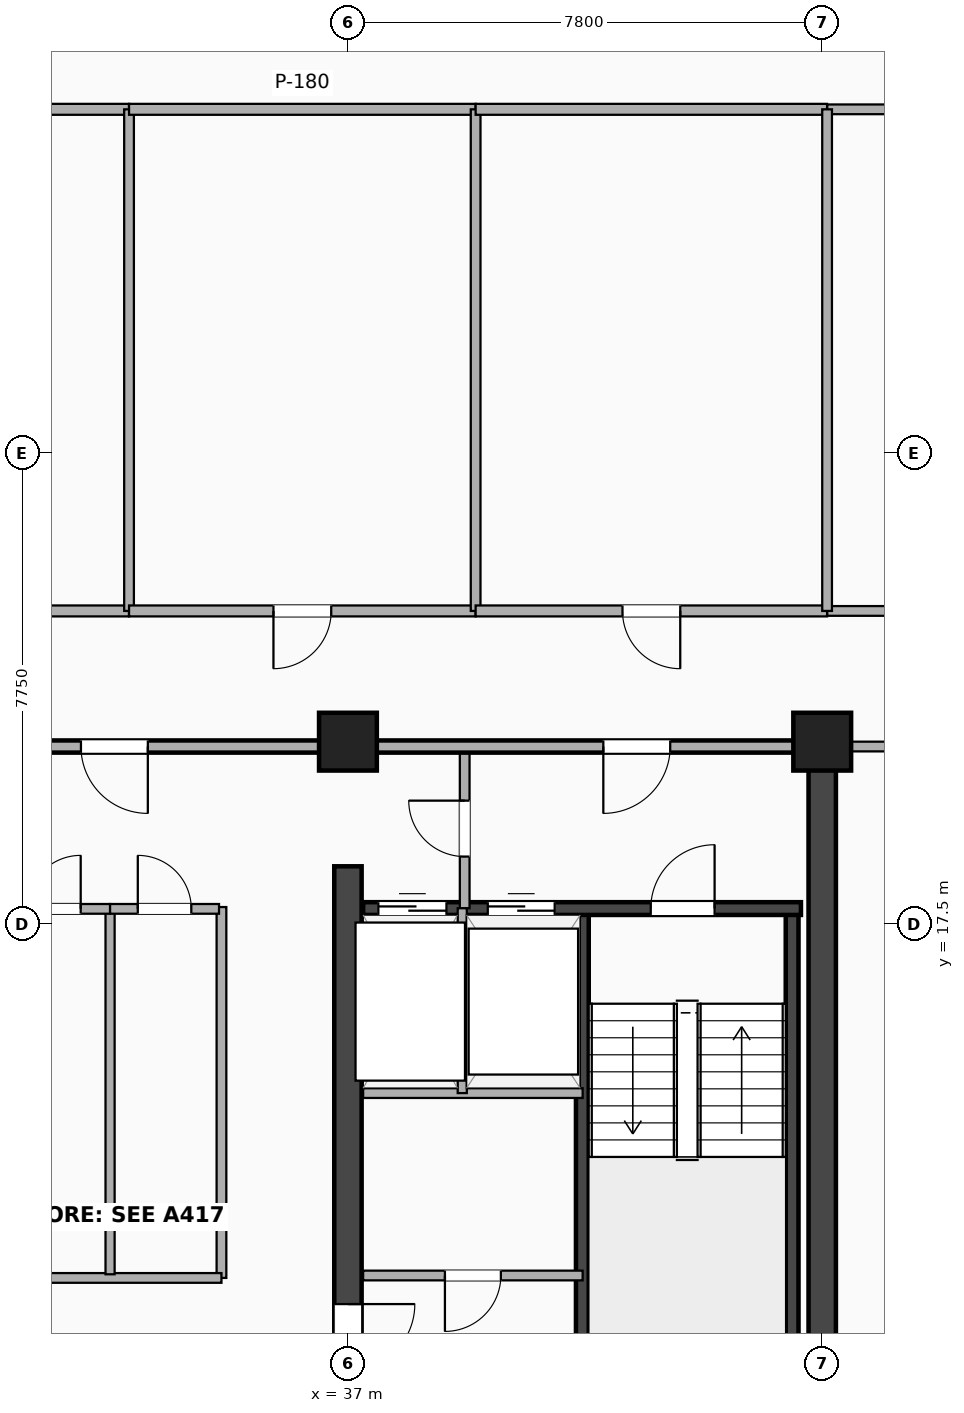
"""IFC4 building model, lengths in metres.
Left out: names, types, materials, properties, quantities, classifications, styles, units other than length and angle.
Written with IfcOpenShell. Run it as: python <this file> out.ifc"""

import sys

from ifc_helpers import new_model, si_unit, direction, frame, frame_2d, origin, origin_2d, place, context, subcontext, project, spatial, rectangle, extrude, element, fill, save


model = new_model("IFC4")
c1 = context("Model", 3, precision=1e-05, world=origin(), true_north=direction((0.0, 1.0)))
c2 = subcontext(c1, "Body", "Model", "MODEL_VIEW")
j1 = project(units=[si_unit("LENGTHUNIT", "METRE"), si_unit("PLANEANGLEUNIT", "RADIAN")], contexts=[c1])
p1 = place(None, origin())
s1 = spatial("IfcSite", under=j1, at=p1, CompositionType="ELEMENT")
p2 = place(p1, origin())
s2 = spatial("IfcBuilding", under=s1, at=p2, CompositionType="ELEMENT")
p3 = place(p2, frame((0.0, 0.0, 224.9)))
s3 = spatial("IfcBuildingStorey", under=s2, at=p3, CompositionType="ELEMENT", Elevation=224.9)
p4 = place(p3, frame((44.8, 3.5, 0.0), z_axis=(0.0, 0.0, 1.0), x_axis=(0.0, 1.0, 0.0)))
e1 = element("IfcWall", 1, at=p4, inside=s3, PredefinedType="SHEAR", context=c2, shape_type="SweptSolid", body=[
    extrude(rectangle(XDim=16.9, YDim=0.45, at=frame_2d((8.45, 0.0))), origin(), (0.0, 0.0, 1.0), 3.26),
])
p5 = place(p3, frame((37.0, 3.5, 0.0), z_axis=(0.0, 0.0, 1.0), x_axis=(0.0, 1.0, 0.0)))
e2 = element("IfcWall", 2, at=p5, inside=s3, PredefinedType="SHEAR", context=c2, shape_type="SweptSolid", body=[
    extrude(rectangle(XDim=14.95, YDim=0.45, at=frame_2d((7.475, 0.0))), origin(), (0.0, 0.0, 1.0), 3.26),
])
p6 = place(p5, frame((6.65, 0.0, 0.0)))
e3 = element("IfcOpeningElement", 3, at=p6, cuts=e2, PredefinedType="OPENING", context=c2, shape_type="SweptSolid", body=[
    extrude(rectangle(XDim=1.1, YDim=2.15, at=frame_2d((0.55, 1.075))), frame((0.0, 0.235, 0.0), z_axis=(0.0, -1.0, 0.0), x_axis=(1.0, 0.0, 0.0)), (0.0, 0.0, 1.0), 0.47),
])
for number, where, z_axis, x_axis in (
    (4, (40.855, 9.745, 0.0), (0.0, 0.0, 1.0), (0.0, 1.0, 0.0)),
    (5, (44.305, 9.745, 0.0), (0.0, 0.0, 1.0), (0.0, 1.0, 0.0)),
):
    element("IfcWall", number, at=place(p3, frame(where, z_axis=z_axis, x_axis=x_axis)), inside=s3, PredefinedType="SHEAR", context=c2, shape_type="SweptSolid", body=[
        extrude(rectangle(XDim=8.01, YDim=0.21, at=frame_2d((4.005, 0.0))), origin(), (0.0, 0.0, 1.0), 3.26),
    ])
p7 = place(p3, frame((37.25, 17.755, 0.0), z_axis=(0.0, 0.0, 1.0), x_axis=(1.0, 0.0, 0.0)))
e6 = element("IfcWall", 6, at=p7, inside=s3, PredefinedType="SHEAR", context=c2, shape_type="SweptSolid", body=[
    extrude(rectangle(XDim=7.2, YDim=0.21, at=frame_2d((3.6, 0.0))), origin(), (0.0, 0.0, 1.0), 3.26),
])
p8 = place(p7, frame((0.25, 0.0, 0.0)))
e7 = element("IfcOpeningElement", 7, at=p8, cuts=e6, PredefinedType="OPENING", context=c2, shape_type="SweptSolid", body=[
    extrude(rectangle(XDim=1.12, YDim=2.2, at=frame_2d((0.56, 1.1))), frame((0.0, 0.115, 0.0), z_axis=(0.0, -1.0, 0.0), x_axis=(1.0, 0.0, 0.0)), (0.0, 0.0, 1.0), 0.23),
])
p9 = place(p7, frame((2.05, 0.0, 0.0)))
e8 = element("IfcOpeningElement", 8, at=p9, cuts=e6, PredefinedType="OPENING", context=c2, shape_type="SweptSolid", body=[
    extrude(rectangle(XDim=1.1, YDim=2.18, at=frame_2d((0.55, 1.09))), frame((0.0, 0.115, 0.0), z_axis=(0.0, -1.0, 0.0), x_axis=(1.0, 0.0, 0.0)), (0.0, 0.0, 1.0), 0.23),
])
p10 = place(p7, frame((5.78, 0.0, 0.0), z_axis=(0.0, 0.0, 1.0), x_axis=(-1.0, 0.0, 0.0)))
e9 = element("IfcOpeningElement", 9, at=p10, cuts=e6, PredefinedType="OPENING", context=c2, shape_type="SweptSolid", body=[
    extrude(rectangle(XDim=1.05, YDim=2.15, at=frame_2d((0.525, 1.075))), frame((0.0, 0.115, 0.0), z_axis=(0.0, -1.0, 0.0), x_axis=(1.0, 0.0, 0.0)), (0.0, 0.0, 1.0), 0.23),
])
for number, where, z_axis, x_axis in (
    (10, (37.0, 20.5, -0.24), (0.0, 0.0, 1.0), (1.0, 0.0, 0.0)),
    (11, (44.8, 20.5, -0.24), (0.0, 0.0, 1.0), (1.0, 0.0, 0.0)),
):
    element("IfcColumn", number, at=place(p3, frame(where, z_axis=z_axis, x_axis=x_axis)), inside=s3, PredefinedType="COLUMN", context=c2, shape_type="SweptSolid", body=[
        extrude(rectangle(XDim=0.95, YDim=0.95, at=origin_2d()), origin(), (0.0, 0.0, 1.0), 3.5),
    ])
p11 = place(p3, frame((38.92, 17.76, 0.0), z_axis=(0.0, 0.0, 1.0), x_axis=(0.0, 1.0, 0.0)))
e12 = element("IfcWall", 12, at=p11, inside=s3, PredefinedType="PARTITIONING", context=c2, shape_type="SweptSolid", body=[
    extrude(rectangle(XDim=2.66, YDim=0.16, at=frame_2d((1.33, 0.0))), origin(), (0.0, 0.0, 1.0), 2.706),
])
p12 = place(p11, frame((1.77, 0.0, 0.0), z_axis=(0.0, 0.0, 1.0), x_axis=(-1.0, 0.0, 0.0)))
e13 = element("IfcOpeningElement", 13, at=p12, cuts=e12, PredefinedType="OPENING", context=c2, shape_type="SweptSolid", body=[
    extrude(rectangle(XDim=0.92, YDim=2.08, at=frame_2d((0.46, 1.04))), frame((0.0, 0.09, 0.0), z_axis=(0.0, -1.0, 0.0), x_axis=(1.0, 0.0, 0.0)), (0.0, 0.0, 1.0), 0.18),
])
p13 = place(p3, frame((37.25, 14.72, 0.0), z_axis=(0.0, 0.0, 1.0), x_axis=(1.0, 0.0, 0.0)))
e14 = element("IfcWall", 14, at=p13, inside=s3, PredefinedType="PARTITIONING", context=c2, shape_type="SweptSolid", body=[
    extrude(rectangle(XDim=3.61, YDim=0.16, at=frame_2d((1.805, 0.0))), origin(), (0.0, 0.0, 1.0), 3.26),
])
p14 = place(p3, frame((38.88, 14.72, 0.0), z_axis=(0.0, 0.0, 1.0), x_axis=(0.0, 1.0, 0.0)))
e15 = element("IfcWall", 15, at=p14, inside=s3, PredefinedType="PARTITIONING", context=c2, shape_type="SweptSolid", body=[
    extrude(rectangle(XDim=3.04, YDim=0.15, at=frame_2d((1.52, 0.0))), origin(), (0.0, 0.0, 1.0), 3.26),
])
p15 = place(p3, frame((29.2, 20.42, 0.0), z_axis=(0.0, 0.0, 1.0), x_axis=(1.0, 0.0, 0.0)))
e16 = element("IfcWall", 16, at=p15, inside=s3, PredefinedType="PARTITIONING", context=c2, shape_type="SweptSolid", body=[
    extrude(rectangle(XDim=7.8, YDim=0.2, at=frame_2d((3.9, 0.0))), origin(), (0.0, 0.0, 1.0), 2.472),
])
p16 = place(p15, frame((3.409, 0.0, 0.0)))
e17 = element("IfcOpeningElement", 17, at=p16, cuts=e16, PredefinedType="OPENING", context=c2, shape_type="SweptSolid", body=[
    extrude(rectangle(XDim=1.1, YDim=2.15, at=frame_2d((0.55, 1.075))), frame((0.0, 0.11, 0.0), z_axis=(0.0, -1.0, 0.0), x_axis=(1.0, 0.0, 0.0)), (0.0, 0.0, 1.0), 0.22),
])
p17 = place(p3, frame((37.0, 20.42, 0.0), z_axis=(0.0, 0.0, 1.0), x_axis=(1.0, 0.0, 0.0)))
e18 = element("IfcWall", 18, at=p17, inside=s3, PredefinedType="PARTITIONING", context=c2, shape_type="SweptSolid", body=[
    extrude(rectangle(XDim=7.45, YDim=0.2, at=frame_2d((3.725, 0.0))), origin(), (0.0, 0.0, 1.0), 2.472),
])
p18 = place(p17, frame((4.2, 0.0, 0.0)))
e19 = element("IfcOpeningElement", 19, at=p18, cuts=e18, PredefinedType="OPENING", context=c2, shape_type="SweptSolid", body=[
    extrude(rectangle(XDim=1.1, YDim=2.15, at=frame_2d((0.55, 1.075))), frame((0.0, 0.11, 0.0), z_axis=(0.0, -1.0, 0.0), x_axis=(1.0, 0.0, 0.0)), (0.0, 0.0, 1.0), 0.22),
])
p19 = place(p3, frame((37.25, 11.72, 0.0), z_axis=(0.0, 0.0, 1.0), x_axis=(1.0, 0.0, 0.0)))
e20 = element("IfcWall", 20, at=p19, inside=s3, PredefinedType="PARTITIONING", context=c2, shape_type="SweptSolid", body=[
    extrude(rectangle(XDim=3.61, YDim=0.16, at=frame_2d((1.805, 0.0))), origin(), (0.0, 0.0, 1.0), 3.26),
])
p20 = place(p19, frame((1.345, 0.0, 0.0)))
e21 = element("IfcOpeningElement", 21, at=p20, cuts=e20, PredefinedType="OPENING", context=c2, shape_type="SweptSolid", body=[
    extrude(rectangle(XDim=0.92, YDim=2.08, at=frame_2d((0.46, 1.04))), frame((0.0, 0.09, 0.0), z_axis=(0.0, -1.0, 0.0), x_axis=(1.0, 0.0, 0.0)), (0.0, 0.0, 1.0), 0.18),
])
p21 = place(p3, frame((34.92, 11.68, 0.0), z_axis=(0.0, 0.0, 1.0), x_axis=(0.0, 1.0, 0.0)))
e22 = element("IfcWall", 22, at=p21, inside=s3, PredefinedType="PARTITIONING", context=c2, shape_type="SweptSolid", body=[
    extrude(rectangle(XDim=6.1, YDim=0.16, at=frame_2d((3.05, 0.0))), origin(), (0.0, 0.0, 1.0), 3.26),
])
p22 = place(p3, frame((29.2, 11.68, 0.0), z_axis=(0.0, 0.0, 1.0), x_axis=(1.0, 0.0, 0.0)))
e23 = element("IfcWall", 23, at=p22, inside=s3, PredefinedType="PARTITIONING", context=c2, shape_type="SweptSolid", body=[
    extrude(rectangle(XDim=5.72, YDim=0.16, at=frame_2d((2.86, 0.0))), origin(), (0.0, 0.0, 1.0), 3.26),
])
p23 = place(p3, frame((33.088, 11.74, 0.0), z_axis=(0.0, 0.0, 1.0), x_axis=(0.0, 1.0, 0.0)))
e24 = element("IfcWall", 24, at=p23, inside=s3, PredefinedType="PARTITIONING", context=c2, shape_type="SweptSolid", body=[
    extrude(rectangle(XDim=6.01, YDim=0.15, at=frame_2d((3.005, 0.0))), origin(), (0.0, 0.0, 1.0), 3.26),
])
p24 = place(p3, frame((31.242, 17.75, 0.0), z_axis=(0.0, 0.0, 1.0), x_axis=(1.0, 0.0, 0.0)))
e25 = element("IfcWall", 25, at=p24, inside=s3, PredefinedType="PARTITIONING", context=c2, shape_type="SweptSolid", body=[
    extrude(rectangle(XDim=1.846, YDim=0.16, at=frame_2d((0.923, 0.0))), origin(), (0.0, 0.0, 1.0), 3.26),
])
p25 = place(p24, frame((1.363, 0.0, 0.0), z_axis=(0.0, 0.0, 1.0), x_axis=(-1.0, 0.0, 0.0)))
e26 = element("IfcOpeningElement", 26, at=p25, cuts=e25, PredefinedType="OPENING", context=c2, shape_type="SweptSolid", body=[
    extrude(rectangle(XDim=0.88, YDim=2.08, at=frame_2d((0.44, 1.04))), frame((0.0, 0.09, 0.0), z_axis=(0.0, -1.0, 0.0), x_axis=(1.0, 0.0, 0.0)), (0.0, 0.0, 1.0), 0.18),
])
p26 = place(p3, frame((33.088, 17.75, 0.0), z_axis=(0.0, 0.0, 1.0), x_axis=(1.0, 0.0, 0.0)))
e27 = element("IfcWall", 27, at=p26, inside=s3, PredefinedType="PARTITIONING", context=c2, shape_type="SweptSolid", body=[
    extrude(rectangle(XDim=1.792, YDim=0.16, at=frame_2d((0.896, 0.0))), origin(), (0.0, 0.0, 1.0), 3.26),
])
p27 = place(p26, frame((1.336, 0.0, 0.0), z_axis=(0.0, 0.0, 1.0), x_axis=(-1.0, 0.0, 0.0)))
e28 = element("IfcOpeningElement", 28, at=p27, cuts=e27, PredefinedType="OPENING", context=c2, shape_type="SweptSolid", body=[
    extrude(rectangle(XDim=0.88, YDim=2.08, at=frame_2d((0.44, 1.04))), frame((0.0, 0.09, 0.0), z_axis=(0.0, -1.0, 0.0), x_axis=(1.0, 0.0, 0.0)), (0.0, 0.0, 1.0), 0.18),
])
p28 = place(p3, frame((44.8, 20.42, 0.0), z_axis=(0.0, 0.0, 1.0), x_axis=(1.0, 0.0, 0.0)))
e29 = element("IfcWall", 29, at=p28, inside=s3, PredefinedType="PARTITIONING", context=c2, shape_type="SweptSolid", body=[
    extrude(rectangle(XDim=8.68, YDim=0.16, at=frame_2d((4.34, 0.0))), origin(), (0.0, 0.0, 1.0), 2.472),
])
p29 = place(p28, frame((2.73, 0.0, 0.0), z_axis=(0.0, 0.0, 1.0), x_axis=(-1.0, 0.0, 0.0)))
e30 = element("IfcOpeningElement", 30, at=p29, cuts=e29, PredefinedType="OPENING", context=c2, shape_type="SweptSolid", body=[
    extrude(rectangle(XDim=0.88, YDim=2.08, at=frame_2d((0.44, 1.04))), frame((0.0, 0.09, 0.0), z_axis=(0.0, -1.0, 0.0), x_axis=(1.0, 0.0, 0.0)), (0.0, 0.0, 1.0), 0.18),
])
p30 = place(p3, frame((44.88, 22.65, 0.0), z_axis=(0.0, 0.0, 1.0), x_axis=(1.0, 0.0, 0.0)))
e31 = element("IfcWall", 31, at=p30, inside=s3, PredefinedType="PARTITIONING", context=c2, shape_type="SweptSolid", body=[
    extrude(rectangle(XDim=8.6, YDim=0.16, at=frame_2d((4.3, 0.0))), origin(), (0.0, 0.0, 1.0), 2.472),
])
p31 = place(p30, frame((1.8, 0.0, 0.0)))
e32 = element("IfcOpeningElement", 32, at=p31, cuts=e31, PredefinedType="OPENING", context=c2, shape_type="SweptSolid", body=[
    extrude(rectangle(XDim=0.88, YDim=2.08, at=frame_2d((0.44, 1.04))), frame((0.0, 0.09, 0.0), z_axis=(0.0, -1.0, 0.0), x_axis=(1.0, 0.0, 0.0)), (0.0, 0.0, 1.0), 0.18),
])
p32 = place(p3, frame((44.88, 30.9, 0.0), z_axis=(0.0, 0.0, 1.0), x_axis=(1.0, 0.0, 0.0)))
e33 = element("IfcWall", 33, at=p32, inside=s3, PredefinedType="PARTITIONING", context=c2, shape_type="SweptSolid", body=[
    extrude(rectangle(XDim=8.6, YDim=0.16, at=frame_2d((4.3, 0.0))), origin(), (0.0, 0.0, 1.0), 2.472),
])
p33 = place(p3, frame((18.65, 22.65, 0.0), z_axis=(0.0, 0.0, 1.0), x_axis=(1.0, 0.0, 0.0)))
e34 = element("IfcWall", 34, at=p33, inside=s3, PredefinedType="PARTITIONING", context=c2, shape_type="SweptSolid", body=[
    extrude(rectangle(XDim=14.75, YDim=0.18, at=frame_2d((7.375, 0.0))), origin(), (0.0, 0.0, 1.0), 2.472),
])
p34 = place(p33, frame((6.9, 0.0, 0.0)))
e35 = element("IfcOpeningElement", 35, at=p34, cuts=e34, PredefinedType="OPENING", context=c2, shape_type="SweptSolid", body=[
    extrude(rectangle(XDim=0.95, YDim=2.15, at=frame_2d((0.475, 1.075))), frame((0.0, 0.1, 0.0), z_axis=(0.0, -1.0, 0.0), x_axis=(1.0, 0.0, 0.0)), (0.0, 0.0, 1.0), 0.2),
])
p35 = place(p3, frame((18.65, 30.9, 0.0), z_axis=(0.0, 0.0, 1.0), x_axis=(1.0, 0.0, 0.0)))
e36 = element("IfcWall", 36, at=p35, inside=s3, PredefinedType="PARTITIONING", context=c2, shape_type="SweptSolid", body=[
    extrude(rectangle(XDim=14.75, YDim=0.18, at=frame_2d((7.375, 0.0))), origin(), (0.0, 0.0, 1.0), 2.472),
])
p36 = place(p3, frame((33.4, 22.65, 0.0), z_axis=(0.0, 0.0, 1.0), x_axis=(0.0, 1.0, 0.0)))
e37 = element("IfcWall", 37, at=p36, inside=s3, PredefinedType="PARTITIONING", context=c2, shape_type="SweptSolid", body=[
    extrude(rectangle(XDim=8.25, YDim=0.16, at=frame_2d((4.125, 0.0))), origin(), (0.0, 0.0, 1.0), 2.887),
])
p37 = place(p3, frame((33.4, 22.65, 0.0), z_axis=(0.0, 0.0, 1.0), x_axis=(1.0, 0.0, 0.0)))
e38 = element("IfcWall", 38, at=p37, inside=s3, PredefinedType="PARTITIONING", context=c2, shape_type="SweptSolid", body=[
    extrude(rectangle(XDim=5.7, YDim=0.18, at=frame_2d((2.85, 0.0))), origin(), (0.0, 0.0, 1.0), 2.472),
])
p38 = place(p37, frame((2.375, 0.0, 0.0)))
e39 = element("IfcOpeningElement", 39, at=p38, cuts=e38, PredefinedType="OPENING", context=c2, shape_type="SweptSolid", body=[
    extrude(rectangle(XDim=0.95, YDim=2.15, at=frame_2d((0.475, 1.075))), frame((0.0, 0.1, 0.0), z_axis=(0.0, -1.0, 0.0), x_axis=(1.0, 0.0, 0.0)), (0.0, 0.0, 1.0), 0.2),
])
p39 = place(p3, frame((33.4, 30.9, 0.0), z_axis=(0.0, 0.0, 1.0), x_axis=(1.0, 0.0, 0.0)))
e40 = element("IfcWall", 40, at=p39, inside=s3, PredefinedType="PARTITIONING", context=c2, shape_type="SweptSolid", body=[
    extrude(rectangle(XDim=5.7, YDim=0.18, at=frame_2d((2.85, 0.0))), origin(), (0.0, 0.0, 1.0), 2.472),
])
p40 = place(p3, frame((39.1, 22.65, 0.0), z_axis=(0.0, 0.0, 1.0), x_axis=(0.0, 1.0, 0.0)))
e41 = element("IfcWall", 41, at=p40, inside=s3, PredefinedType="PARTITIONING", context=c2, shape_type="SweptSolid", body=[
    extrude(rectangle(XDim=8.25, YDim=0.16, at=frame_2d((4.125, 0.0))), origin(), (0.0, 0.0, 1.0), 2.887),
])
p41 = place(p3, frame((39.1, 22.65, 0.0), z_axis=(0.0, 0.0, 1.0), x_axis=(1.0, 0.0, 0.0)))
e42 = element("IfcWall", 42, at=p41, inside=s3, PredefinedType="PARTITIONING", context=c2, shape_type="SweptSolid", body=[
    extrude(rectangle(XDim=5.78, YDim=0.18, at=frame_2d((2.89, 0.0))), origin(), (0.0, 0.0, 1.0), 2.472),
])
p42 = place(p41, frame((2.415, 0.0, 0.0)))
e43 = element("IfcOpeningElement", 43, at=p42, cuts=e42, PredefinedType="OPENING", context=c2, shape_type="SweptSolid", body=[
    extrude(rectangle(XDim=0.95, YDim=2.15, at=frame_2d((0.475, 1.075))), frame((0.0, 0.1, 0.0), z_axis=(0.0, -1.0, 0.0), x_axis=(1.0, 0.0, 0.0)), (0.0, 0.0, 1.0), 0.2),
])
p43 = place(p3, frame((39.1, 30.9, 0.0), z_axis=(0.0, 0.0, 1.0), x_axis=(1.0, 0.0, 0.0)))
e44 = element("IfcWall", 44, at=p43, inside=s3, PredefinedType="PARTITIONING", context=c2, shape_type="SweptSolid", body=[
    extrude(rectangle(XDim=5.78, YDim=0.18, at=frame_2d((2.89, 0.0))), origin(), (0.0, 0.0, 1.0), 2.472),
])
p44 = place(p3, frame((44.88, 22.65, 0.0), z_axis=(0.0, 0.0, 1.0), x_axis=(0.0, 1.0, 0.0)))
e45 = element("IfcWall", 45, at=p44, inside=s3, PredefinedType="PARTITIONING", context=c2, shape_type="SweptSolid", body=[
    extrude(rectangle(XDim=8.25, YDim=0.16, at=frame_2d((4.125, 0.0))), origin(), (0.0, 0.0, 1.0), 2.472),
])
p45 = place(p8, origin())
e46 = element("IfcDoor", 46, at=p45, inside=s3, OperationType="DOUBLE_DOOR_SLIDING", PredefinedType="DOOR", context=c2, shape_type="SweptSolid", body=[
    extrude(rectangle(XDim=1.12, YDim=2.2, at=frame_2d((0.56, 1.1))), frame((0.0, 0.025, 0.0), z_axis=(0.0, -1.0, 0.0), x_axis=(1.0, 0.0, 0.0)), (0.0, 0.0, 1.0), 0.05),
])
fill(e7, e46)
p46 = place(p9, origin())
e47 = element("IfcDoor", 47, at=p46, inside=s3, OperationType="DOUBLE_DOOR_SLIDING", PredefinedType="DOOR", context=c2, shape_type="SweptSolid", body=[
    extrude(rectangle(XDim=1.1, YDim=2.18, at=frame_2d((0.55, 1.09))), frame((0.0, 0.025, 0.0), z_axis=(0.0, -1.0, 0.0), x_axis=(1.0, 0.0, 0.0)), (0.0, 0.0, 1.0), 0.05),
])
fill(e8, e47)
p47 = place(p10, origin())
e48 = element("IfcDoor", 48, at=p47, inside=s3, OperationType="SINGLE_SWING_RIGHT", PredefinedType="DOOR", context=c2, shape_type="SweptSolid", body=[
    extrude(rectangle(XDim=1.05, YDim=2.15, at=frame_2d((0.525, 1.075))), frame((0.0, 0.025, 0.0), z_axis=(0.0, -1.0, 0.0), x_axis=(1.0, 0.0, 0.0)), (0.0, 0.0, 1.0), 0.05),
])
fill(e9, e48)
p48 = place(p6, origin())
e49 = element("IfcDoor", 49, at=p48, inside=s3, OperationType="SINGLE_SWING_RIGHT", PredefinedType="DOOR", context=c2, shape_type="SweptSolid", body=[
    extrude(rectangle(XDim=1.1, YDim=2.15, at=frame_2d((0.55, 1.075))), frame((0.0, 0.025, 0.0), z_axis=(0.0, -1.0, 0.0), x_axis=(1.0, 0.0, 0.0)), (0.0, 0.0, 1.0), 0.05),
])
fill(e3, e49)
p49 = place(p12, origin())
e50 = element("IfcDoor", 50, at=p49, inside=s3, OperationType="SINGLE_SWING_RIGHT", PredefinedType="DOOR", context=c2, shape_type="SweptSolid", body=[
    extrude(rectangle(XDim=0.92, YDim=2.08, at=frame_2d((0.46, 1.04))), frame((0.0, 0.025, 0.0), z_axis=(0.0, -1.0, 0.0), x_axis=(1.0, 0.0, 0.0)), (0.0, 0.0, 1.0), 0.05),
])
fill(e13, e50)
p50 = place(p16, origin())
e51 = element("IfcDoor", 51, at=p50, inside=s3, OperationType="SINGLE_SWING_RIGHT", PredefinedType="DOOR", context=c2, shape_type="SweptSolid", body=[
    extrude(rectangle(XDim=1.1, YDim=2.15, at=frame_2d((0.55, 1.075))), frame((0.0, 0.025, 0.0), z_axis=(0.0, -1.0, 0.0), x_axis=(1.0, 0.0, 0.0)), (0.0, 0.0, 1.0), 0.05),
])
fill(e17, e51)
p51 = place(p18, origin())
e52 = element("IfcDoor", 52, at=p51, inside=s3, OperationType="SINGLE_SWING_LEFT", PredefinedType="DOOR", context=c2, shape_type="SweptSolid", body=[
    extrude(rectangle(XDim=1.1, YDim=2.15, at=frame_2d((0.55, 1.075))), frame((0.0, 0.025, 0.0), z_axis=(0.0, -1.0, 0.0), x_axis=(1.0, 0.0, 0.0)), (0.0, 0.0, 1.0), 0.05),
])
fill(e19, e52)
p52 = place(p20, origin())
e53 = element("IfcDoor", 53, at=p52, inside=s3, OperationType="SINGLE_SWING_LEFT", PredefinedType="DOOR", context=c2, shape_type="SweptSolid", body=[
    extrude(rectangle(XDim=0.92, YDim=2.08, at=frame_2d((0.46, 1.04))), frame((0.0, 0.025, 0.0), z_axis=(0.0, -1.0, 0.0), x_axis=(1.0, 0.0, 0.0)), (0.0, 0.0, 1.0), 0.05),
])
fill(e21, e53)
p53 = place(p25, origin())
e54 = element("IfcDoor", 54, at=p53, inside=s3, OperationType="SINGLE_SWING_RIGHT", PredefinedType="DOOR", context=c2, shape_type="SweptSolid", body=[
    extrude(rectangle(XDim=0.88, YDim=2.08, at=frame_2d((0.44, 1.04))), frame((0.0, 0.025, 0.0), z_axis=(0.0, -1.0, 0.0), x_axis=(1.0, 0.0, 0.0)), (0.0, 0.0, 1.0), 0.05),
])
fill(e26, e54)
p54 = place(p27, origin())
e55 = element("IfcDoor", 55, at=p54, inside=s3, OperationType="SINGLE_SWING_LEFT", PredefinedType="DOOR", context=c2, shape_type="SweptSolid", body=[
    extrude(rectangle(XDim=0.88, YDim=2.08, at=frame_2d((0.44, 1.04))), frame((0.0, 0.025, 0.0), z_axis=(0.0, -1.0, 0.0), x_axis=(1.0, 0.0, 0.0)), (0.0, 0.0, 1.0), 0.05),
])
fill(e28, e55)
p55 = place(p38, origin())
e56 = element("IfcDoor", 56, at=p55, inside=s3, OperationType="SINGLE_SWING_LEFT", PredefinedType="DOOR", context=c2, shape_type="SweptSolid", body=[
    extrude(rectangle(XDim=0.95, YDim=2.15, at=frame_2d((0.475, 1.075))), frame((0.0, 0.025, 0.0), z_axis=(0.0, -1.0, 0.0), x_axis=(1.0, 0.0, 0.0)), (0.0, 0.0, 1.0), 0.05),
])
fill(e39, e56)
p56 = place(p42, origin())
e57 = element("IfcDoor", 57, at=p56, inside=s3, OperationType="SINGLE_SWING_RIGHT", PredefinedType="DOOR", context=c2, shape_type="SweptSolid", body=[
    extrude(rectangle(XDim=0.95, YDim=2.15, at=frame_2d((0.475, 1.075))), frame((0.0, 0.025, 0.0), z_axis=(0.0, -1.0, 0.0), x_axis=(1.0, 0.0, 0.0)), (0.0, 0.0, 1.0), 0.05),
])
fill(e43, e57)
save(model, sys.argv[1])
